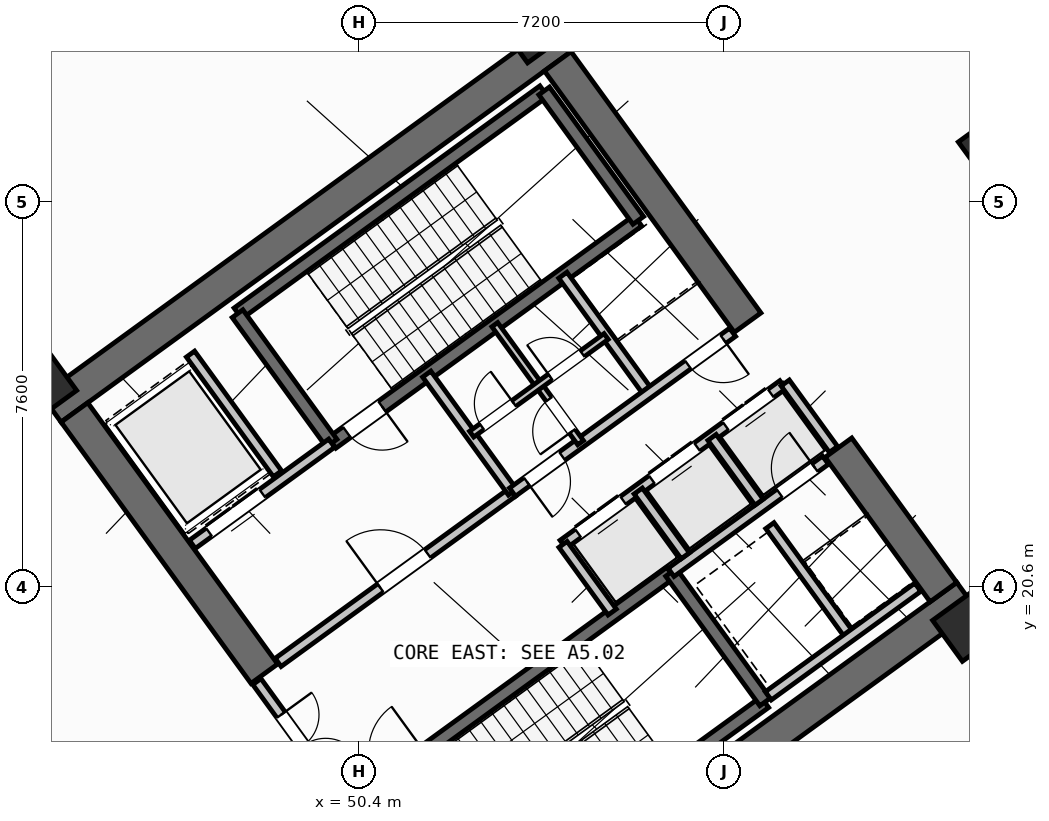
"""IFC4 building model, lengths in metres.
Left out: names, types, materials, properties, quantities, classifications, styles, units other than length and angle.
Written with IfcOpenShell. Run it as: python <this file> out.ifc"""

import sys

from ifc_helpers import new_model, si_unit, direction, frame, frame_2d, origin, origin_2d, place, context, subcontext, project, spatial, rectangle, hollow_rectangle, extrude, source, transform, mapped, element, fill, save


model = new_model("IFC4")
c1 = context("Model", 3, precision=1e-05, world=origin(), true_north=direction((0.0, 1.0)))
c2 = subcontext(c1, "Body", "Model", "MODEL_VIEW")
j1 = project(units=[si_unit("LENGTHUNIT", "METRE"), si_unit("PLANEANGLEUNIT", "RADIAN")], contexts=[c1])
p1 = place(None, origin())
s1 = spatial("IfcSite", under=j1, at=p1, CompositionType="ELEMENT")
p2 = place(p1, origin())
s2 = spatial("IfcBuilding", under=s1, at=p2, CompositionType="ELEMENT")
p3 = place(p2, frame((0.0, 0.0, 5.4)))
s3 = spatial("IfcBuildingStorey", under=s2, at=p3, CompositionType="ELEMENT", Elevation=5.4)
p4 = place(p3, frame((52.318, 13.11, 0.0), z_axis=(0.0, 0.0, 1.0), x_axis=(0.809019445368, 0.587781878776, 0.0)))
e1 = element("IfcWall", 1, at=p4, inside=s3, PredefinedType="SHEAR", context=c2, shape_type="SweptSolid", body=[
    extrude(rectangle(XDim=12.44, YDim=0.65, at=frame_2d((6.22, 0.0))), origin(), (0.0, 0.0, 1.0), 4.45),
])
p5 = place(p3, frame((44.325, 24.113, 0.0), z_axis=(0.0, 0.0, 1.0), x_axis=(0.809012664862, 0.58779121131, 0.0)))
e2 = element("IfcWall", 2, at=p5, inside=s3, PredefinedType="SHEAR", context=c2, shape_type="SweptSolid", body=[
    extrude(rectangle(XDim=12.44, YDim=0.65, at=frame_2d((6.22, 0.0))), origin(), (0.0, 0.0, 1.0), 4.45),
])
p6 = place(p3, frame((48.526, 18.884, 0.0), z_axis=(0.0, 0.0, 1.0), x_axis=(-0.58777996584, 0.809020835181, 0.0)))
e3 = element("IfcWall", 3, at=p6, inside=s3, PredefinedType="SHEAR", context=c2, shape_type="SweptSolid", body=[
    extrude(rectangle(XDim=6.375, YDim=0.65, at=frame_2d((3.188, 0.0))), origin(), (0.0, 0.0, 1.0), 4.45),
])
p7 = place(p3, frame((61.929, 20.494, 0.0), z_axis=(0.0, 0.0, 1.0), x_axis=(-0.58782982593, 0.808984607855, 0.0)))
e4 = element("IfcWall", 4, at=p7, inside=s3, PredefinedType="SHEAR", context=c2, shape_type="SweptSolid", body=[
    extrude(rectangle(XDim=3.525, YDim=0.65, at=frame_2d((1.762, 0.0))), origin(), (0.0, 0.0, 1.0), 4.45),
])
p8 = place(p3, frame((58.064, 25.813, 0.0), z_axis=(0.0, 0.0, 1.0), x_axis=(-0.58777996584, 0.809020835181, 0.0)))
e5 = element("IfcWall", 5, at=p8, inside=s3, PredefinedType="SHEAR", context=c2, shape_type="SweptSolid", body=[
    extrude(rectangle(XDim=6.375, YDim=0.65, at=frame_2d((3.188, 0.0))), origin(), (0.0, 0.0, 1.0), 4.45),
])
m1 = source(origin(), c2, "Body", "SweptSolid", [
    extrude(hollow_rectangle(XDim=1.08, YDim=1.08, WallThickness=0.04, at=origin_2d()), origin(), (0.0, 0.0, 1.0), 4.8),
])
p9 = place(p3, frame((62.977, 29.259, 0.0), z_axis=(0.0, 0.0, 1.0), x_axis=(0.809016994375, 0.587785252292, 0.0)))
e6 = element("IfcColumn", 6, at=p9, inside=s3, PredefinedType="COLUMN", context=c2, shape_type="MappedRepresentation", body=[
    mapped(m1, transform((0.0, 0.0, 0.0), scale=1.0)),
])
m2 = source(origin(), c2, "Body", "SweptSolid", [
    extrude(hollow_rectangle(XDim=1.0, YDim=1.0, WallThickness=0.04, at=origin_2d()), origin(), (0.0, 0.0, 1.0), 4.8),
])
for number, where, z_axis, x_axis in (
    (7, (44.124, 24.585, 0.0), (0.0, 0.0, 1.0), (0.809, 0.588, 0.0)),
    (8, (62.414, 19.827, 0.0), (0.0, 0.0, 1.0), (0.809, 0.588, 0.0)),
    (9, (53.832, 31.638, 0.0), (0.0, 0.0, 1.0), (0.809, 0.588, 0.0)),
):
    element("IfcColumn", number, at=place(p3, frame(where, z_axis=z_axis, x_axis=x_axis)), inside=s3, PredefinedType="COLUMN", context=c2, shape_type="MappedRepresentation", body=[
        mapped(m2, transform((0.0, 0.0, 0.0), scale=1.0)),
    ])
p10 = place(p3, frame((48.006, 25.996, 0.0), z_axis=(0.0, 0.0, 1.0), x_axis=(0.80901903764, 0.587782439969, 0.0)))
e10 = element("IfcWall", 10, at=p10, inside=s3, PredefinedType="SHEAR", context=c2, shape_type="SweptSolid", body=[
    extrude(rectangle(XDim=7.46, YDim=0.26, at=frame_2d((3.73, 0.0))), origin(), (0.0, 0.0, 1.0), 4.45),
])
p11 = place(p3, frame((49.863, 23.44, 0.0), z_axis=(0.0, 0.0, 1.0), x_axis=(0.809003474932, 0.587803859759, 0.0)))
e11 = element("IfcWall", 11, at=p11, inside=s3, PredefinedType="SHEAR", context=c2, shape_type="SweptSolid", body=[
    extrude(rectangle(XDim=7.46, YDim=0.26, at=frame_2d((3.73, 0.0))), origin(), (0.0, 0.0, 1.0), 4.45),
])
p12 = place(p11, frame((0.36, 0.0, 0.0)))
e12 = element("IfcOpeningElement", 12, at=p12, cuts=e11, PredefinedType="OPENING", context=c2, shape_type="SweptSolid", body=[
    extrude(rectangle(XDim=0.86, YDim=2.05, at=frame_2d((0.43, 1.025))), frame((0.0, 0.14, 0.0), z_axis=(0.0, -1.0, 0.0), x_axis=(1.0, 0.0, 0.0)), (0.0, 0.0, 1.0), 0.28),
])
p13 = place(p3, frame((49.855, 23.434, 0.0), z_axis=(0.0, 0.0, 1.0), x_axis=(-0.58776738483, 0.809029975545, 0.0)))
e13 = element("IfcWall", 13, at=p13, inside=s3, PredefinedType="SHEAR", context=c2, shape_type="SweptSolid", body=[
    extrude(rectangle(XDim=3.16, YDim=0.26, at=frame_2d((1.58, 0.0))), origin(), (0.0, 0.0, 1.0), 4.45),
])
p14 = place(p3, frame((55.906, 27.831, 0.0), z_axis=(0.0, 0.0, 1.0), x_axis=(-0.587804123638, 0.809003283204, 0.0)))
e14 = element("IfcWall", 14, at=p14, inside=s3, PredefinedType="SHEAR", context=c2, shape_type="SweptSolid", body=[
    extrude(rectangle(XDim=3.16, YDim=0.26, at=frame_2d((1.58, 0.0))), origin(), (0.0, 0.0, 1.0), 4.45),
])
p15 = place(p3, frame((52.472, 14.013, 0.0), z_axis=(0.0, 0.0, 1.0), x_axis=(0.809028366311, 0.587769599847, 0.0)))
e15 = element("IfcWall", 15, at=p15, inside=s3, PredefinedType="SHEAR", context=c2, shape_type="SweptSolid", body=[
    extrude(rectangle(XDim=7.33, YDim=0.26, at=frame_2d((3.665, 0.0))), origin(), (0.0, 0.0, 1.0), 4.45),
])
p16 = place(p3, frame((50.615, 16.57, 0.0), z_axis=(0.0, 0.0, 1.0), x_axis=(0.809028366311, 0.587769599847, 0.0)))
e16 = element("IfcWall", 16, at=p16, inside=s3, PredefinedType="SHEAR", context=c2, shape_type="SweptSolid", body=[
    extrude(rectangle(XDim=7.33, YDim=0.26, at=frame_2d((3.665, 0.0))), origin(), (0.0, 0.0, 1.0), 4.45),
])
p17 = place(p16, frame((0.22, 0.0, 0.0)))
e17 = element("IfcOpeningElement", 17, at=p17, cuts=e16, PredefinedType="OPENING", context=c2, shape_type="SweptSolid", body=[
    extrude(rectangle(XDim=1.1, YDim=2.1, at=frame_2d((0.55, 1.05))), frame((0.0, 0.14, 0.0), z_axis=(0.0, -1.0, 0.0), x_axis=(1.0, 0.0, 0.0)), (0.0, 0.0, 1.0), 0.28),
])
p18 = place(p3, frame((58.41, 18.327, 0.0), z_axis=(0.0, 0.0, 1.0), x_axis=(-0.58776738483, 0.809029975545, 0.0)))
e18 = element("IfcWall", 18, at=p18, inside=s3, PredefinedType="SHEAR", context=c2, shape_type="SweptSolid", body=[
    extrude(rectangle(XDim=3.16, YDim=0.26, at=frame_2d((1.58, 0.0))), origin(), (0.0, 0.0, 1.0), 4.45),
])
p19 = place(p3, frame((47.106, 21.437, 0.0), z_axis=(0.0, 0.0, 1.0), x_axis=(0.809012514015, 0.58779141893, 0.0)))
e19 = element("IfcWall", 19, at=p19, inside=s3, PredefinedType="STANDARD", context=c2, shape_type="SweptSolid", body=[
    extrude(rectangle(XDim=3.398, YDim=0.2, at=frame_2d((1.699, 0.0))), origin(), (0.0, 0.0, 1.0), 4.44),
])
p20 = place(p19, frame((0.408, 0.0, 0.0)))
e20 = element("IfcOpeningElement", 20, at=p20, cuts=e19, PredefinedType="OPENING", context=c2, shape_type="SweptSolid", body=[
    extrude(rectangle(XDim=1.3, YDim=2.2, at=frame_2d((0.65, 1.1))), frame((0.0, 0.11, 0.0), z_axis=(0.0, -1.0, 0.0), x_axis=(1.0, 0.0, 0.0)), (0.0, 0.0, 1.0), 0.22),
])
p21 = place(p3, frame((48.799, 19.107, 0.0), z_axis=(0.0, 0.0, 1.0), x_axis=(0.809012959416, 0.587790805897, 0.0)))
e21 = element("IfcWall", 21, at=p21, inside=s3, PredefinedType="STANDARD", context=c2, shape_type="SweptSolid", body=[
    extrude(rectangle(XDim=5.718, YDim=0.2, at=frame_2d((2.859, 0.0))), origin(), (0.0, 0.0, 1.0), 4.44),
])
p22 = place(p21, frame((2.498, 0.0, 0.0)))
e22 = element("IfcOpeningElement", 22, at=p22, cuts=e21, PredefinedType="OPENING", context=c2, shape_type="SweptSolid", body=[
    extrude(rectangle(XDim=1.15, YDim=2.1, at=frame_2d((0.575, 1.05))), frame((0.0, 0.11, 0.0), z_axis=(0.0, -1.0, 0.0), x_axis=(1.0, 0.0, 0.0)), (0.0, 0.0, 1.0), 0.22),
])
p23 = place(p3, frame((56.553, 20.884, 0.0), z_axis=(0.0, 0.0, 1.0), x_axis=(0.809035789462, 0.587759382205, 0.0)))
e23 = element("IfcWall", 23, at=p23, inside=s3, PredefinedType="STANDARD", context=c2, shape_type="SweptSolid", body=[
    extrude(rectangle(XDim=3.768, YDim=0.2, at=frame_2d((1.884, 0.0))), origin(), (0.0, 0.0, 1.0), 4.44),
])
p24 = place(p23, frame((2.65, 0.0, 0.0)))
e24 = element("IfcOpeningElement", 24, at=p24, cuts=e23, PredefinedType="OPENING", context=c2, shape_type="SweptSolid", body=[
    extrude(rectangle(XDim=0.86, YDim=2.05, at=frame_2d((0.43, 1.025))), frame((0.0, 0.11, 0.0), z_axis=(0.0, -1.0, 0.0), x_axis=(1.0, 0.0, 0.0)), (0.0, 0.0, 1.0), 0.22),
])
p25 = place(p3, frame((54.421, 21.436, 0.0), z_axis=(0.0, 0.0, 1.0), x_axis=(0.809013710463, 0.587789772183, 0.0)))
e25 = element("IfcWall", 25, at=p25, inside=s3, PredefinedType="STANDARD", context=c2, shape_type="SweptSolid", body=[
    extrude(rectangle(XDim=5.36, YDim=0.2, at=frame_2d((2.68, 0.0))), origin(), (0.0, 0.0, 1.0), 4.44),
])
p26 = place(p25, frame((0.37, 0.0, 0.0)))
e26 = element("IfcOpeningElement", 26, at=p26, cuts=e25, PredefinedType="OPENING", context=c2, shape_type="SweptSolid", body=[
    extrude(rectangle(XDim=1.1, YDim=2.15, at=frame_2d((0.55, 1.075))), frame((0.0, 0.11, 0.0), z_axis=(0.0, -1.0, 0.0), x_axis=(1.0, 0.0, 0.0)), (0.0, 0.0, 1.0), 0.22),
])
p27 = place(p25, frame((2.17, 0.0, 0.0)))
e27 = element("IfcOpeningElement", 27, at=p27, cuts=e25, PredefinedType="OPENING", context=c2, shape_type="SweptSolid", body=[
    extrude(rectangle(XDim=1.1, YDim=2.15, at=frame_2d((0.55, 1.075))), frame((0.0, 0.11, 0.0), z_axis=(0.0, -1.0, 0.0), x_axis=(1.0, 0.0, 0.0)), (0.0, 0.0, 1.0), 0.22),
])
p28 = place(p25, frame((3.97, 0.0, 0.0)))
e28 = element("IfcOpeningElement", 28, at=p28, cuts=e25, PredefinedType="OPENING", context=c2, shape_type="SweptSolid", body=[
    extrude(rectangle(XDim=1.1, YDim=2.15, at=frame_2d((0.55, 1.075))), frame((0.0, 0.11, 0.0), z_axis=(0.0, -1.0, 0.0), x_axis=(1.0, 0.0, 0.0)), (0.0, 0.0, 1.0), 0.22),
])
p29 = place(p3, frame((55.391, 20.102, 0.0), z_axis=(0.0, 0.0, 1.0), x_axis=(-0.58778447739, 0.809017557374, 0.0)))
e29 = element("IfcWall", 29, at=p29, inside=s3, PredefinedType="STANDARD", context=c2, shape_type="SweptSolid", body=[
    extrude(rectangle(XDim=1.65, YDim=0.2, at=frame_2d((0.825, 0.0))), origin(), (0.0, 0.0, 1.0), 4.44),
])
p30 = place(p3, frame((48.786, 22.83, 0.0), z_axis=(0.0, 0.0, 1.0), x_axis=(-0.587783856777, 0.809018008275, 0.0)))
e30 = element("IfcWall", 30, at=p30, inside=s3, PredefinedType="STANDARD", context=c2, shape_type="SweptSolid", body=[
    extrude(rectangle(XDim=2.92, YDim=0.2, at=frame_2d((1.46, 0.0))), origin(), (0.0, 0.0, 1.0), 4.44),
])
p31 = place(p3, frame((56.834, 21.212, 0.0), z_axis=(0.0, 0.0, 1.0), x_axis=(-0.58776738483, 0.809029975545, 0.0)))
e31 = element("IfcWall", 31, at=p31, inside=s3, PredefinedType="STANDARD", context=c2, shape_type="SweptSolid", body=[
    extrude(rectangle(XDim=1.58, YDim=0.2, at=frame_2d((0.79, 0.0))), origin(), (0.0, 0.0, 1.0), 4.44),
])
p32 = place(p3, frame((58.29, 22.27, 0.0), z_axis=(0.0, 0.0, 1.0), x_axis=(-0.587840865826, 0.808976585857, 0.0)))
e32 = element("IfcWall", 32, at=p32, inside=s3, PredefinedType="STANDARD", context=c2, shape_type="SweptSolid", body=[
    extrude(rectangle(XDim=1.58, YDim=0.2, at=frame_2d((0.79, 0.0))), origin(), (0.0, 0.0, 1.0), 4.44),
])
p33 = place(p3, frame((59.758, 23.312, 0.0), z_axis=(0.0, 0.0, 1.0), x_axis=(-0.587875962906, 0.808951081486, 0.0)))
e33 = element("IfcWall", 33, at=p33, inside=s3, PredefinedType="STANDARD", context=c2, shape_type="SweptSolid", body=[
    extrude(rectangle(XDim=1.62, YDim=0.2, at=frame_2d((0.81, 0.0))), origin(), (0.0, 0.0, 1.0), 4.44),
])
p34 = place(p3, frame((60.067, 19.655, 0.0), z_axis=(0.0, 0.0, 1.0), x_axis=(-0.587800520745, 0.809005900975, 0.0)))
e34 = element("IfcWall", 34, at=p34, inside=s3, PredefinedType="STANDARD", context=c2, shape_type="SweptSolid", body=[
    extrude(rectangle(XDim=2.66, YDim=0.2, at=frame_2d((1.33, 0.0))), origin(), (0.0, 0.0, 1.0), 4.44),
])
p35 = place(p3, frame((58.472, 18.447, 0.0), z_axis=(0.0, 0.0, 1.0), x_axis=(0.809022487728, 0.587777691266, 0.0)))
e35 = element("IfcWall", 35, at=p35, inside=s3, PredefinedType="STANDARD", context=c2, shape_type="SweptSolid", body=[
    extrude(rectangle(XDim=3.648, YDim=0.2, at=frame_2d((1.824, 0.0))), origin(), (0.0, 0.0, 1.0), 4.44),
])
p36 = place(p3, frame((53.425, 22.468, 0.0), z_axis=(0.0, 0.0, 1.0), x_axis=(-0.5877230039, 0.809062216821, 0.0)))
e36 = element("IfcWall", 36, at=p36, inside=s3, PredefinedType="STANDARD", context=c2, shape_type="SweptSolid", body=[
    extrude(rectangle(XDim=2.88, YDim=0.2, at=frame_2d((1.44, 0.0))), origin(), (0.0, 0.0, 1.0), 4.44),
])
p37 = place(p3, frame((56.111, 24.419, 0.0), z_axis=(0.0, 0.0, 1.0), x_axis=(-0.58777848983, 0.809021907548, 0.0)))
e37 = element("IfcWall", 37, at=p37, inside=s3, PredefinedType="STANDARD", context=c2, shape_type="SweptSolid", body=[
    extrude(rectangle(XDim=2.88, YDim=0.2, at=frame_2d((1.44, 0.0))), origin(), (0.0, 0.0, 1.0), 4.44),
])
p38 = place(p3, frame((53.425, 22.468, 0.0), z_axis=(0.0, 0.0, 1.0), x_axis=(0.80902705128, 0.587771409902, 0.0)))
e38 = element("IfcWall", 38, at=p38, inside=s3, PredefinedType="STANDARD", context=c2, shape_type="SweptSolid", body=[
    extrude(rectangle(XDim=5.368, YDim=0.2, at=frame_2d((2.684, 0.0))), origin(), (0.0, 0.0, 1.0), 4.44),
])
p39 = place(p38, frame((4.28, 0.0, 0.0)))
e39 = element("IfcOpeningElement", 39, at=p39, cuts=e38, PredefinedType="OPENING", context=c2, shape_type="SweptSolid", body=[
    extrude(rectangle(XDim=0.86, YDim=2.05, at=frame_2d((0.43, 1.025))), frame((0.0, 0.11, 0.0), z_axis=(0.0, -1.0, 0.0), x_axis=(1.0, 0.0, 0.0)), (0.0, 0.0, 1.0), 0.22),
])
p40 = place(p38, frame((0.35, 0.0, 0.0)))
e40 = element("IfcOpeningElement", 40, at=p40, cuts=e38, PredefinedType="OPENING", context=c2, shape_type="SweptSolid", body=[
    extrude(rectangle(XDim=0.86, YDim=2.05, at=frame_2d((0.43, 1.025))), frame((0.0, 0.11, 0.0), z_axis=(0.0, -1.0, 0.0), x_axis=(1.0, 0.0, 0.0)), (0.0, 0.0, 1.0), 0.22),
])
p41 = place(p3, frame((54.768, 23.443, 0.0), z_axis=(0.0, 0.0, 1.0), x_axis=(-0.587736077749, 0.809052719489, 0.0)))
e41 = element("IfcWall", 41, at=p41, inside=s3, PredefinedType="PLUMBINGWALL", context=c2, shape_type="SweptSolid", body=[
    extrude(rectangle(XDim=1.4, YDim=0.14, at=frame_2d((0.7, 0.0))), origin(), (0.0, 0.0, 1.0), 4.44),
])
p42 = place(p41, frame((0.28, 0.0, 0.0)))
e42 = element("IfcOpeningElement", 42, at=p42, cuts=e41, PredefinedType="OPENING", context=c2, shape_type="SweptSolid", body=[
    extrude(rectangle(XDim=0.78, YDim=2.05, at=frame_2d((0.39, 1.025))), frame((0.0, 0.08, 0.0), z_axis=(0.0, -1.0, 0.0), x_axis=(1.0, 0.0, 0.0)), (0.0, 0.0, 1.0), 0.16),
])
p43 = place(p3, frame((53.945, 24.576, 0.0), z_axis=(0.0, 0.0, 1.0), x_axis=(-0.587897037186, 0.808935766095, 0.0)))
e43 = element("IfcWall", 43, at=p43, inside=s3, PredefinedType="PLUMBINGWALL", context=c2, shape_type="SweptSolid", body=[
    extrude(rectangle(XDim=1.48, YDim=0.14, at=frame_2d((0.74, 0.0))), origin(), (0.0, 0.0, 1.0), 4.44),
])
p44 = place(p3, frame((52.618, 23.612, 0.0), z_axis=(0.0, 0.0, 1.0), x_axis=(0.809009587469, 0.587795446889, 0.0)))
e44 = element("IfcWall", 44, at=p44, inside=s3, PredefinedType="PLUMBINGWALL", context=c2, shape_type="SweptSolid", body=[
    extrude(rectangle(XDim=3.28, YDim=0.14, at=frame_2d((1.64, 0.0))), origin(), (0.0, 0.0, 1.0), 4.44),
])
p45 = place(p44, frame((0.25, 0.0, 0.0)))
e45 = element("IfcOpeningElement", 45, at=p45, cuts=e44, PredefinedType="OPENING", context=c2, shape_type="SweptSolid", body=[
    extrude(rectangle(XDim=0.78, YDim=2.05, at=frame_2d((0.39, 1.025))), frame((0.0, 0.08, 0.0), z_axis=(0.0, -1.0, 0.0), x_axis=(1.0, 0.0, 0.0)), (0.0, 0.0, 1.0), 0.16),
])
p46 = place(p44, frame((1.92, 0.0, 0.0)))
e46 = element("IfcOpeningElement", 46, at=p46, cuts=e44, PredefinedType="OPENING", context=c2, shape_type="SweptSolid", body=[
    extrude(rectangle(XDim=0.78, YDim=2.05, at=frame_2d((0.39, 1.025))), frame((0.0, 0.08, 0.0), z_axis=(0.0, -1.0, 0.0), x_axis=(1.0, 0.0, 0.0)), (0.0, 0.0, 1.0), 0.16),
])
p47 = place(p3, frame((50.119, 16.333, 0.0), z_axis=(0.0, 0.0, 1.0), x_axis=(-0.587749856981, 0.809042709391, 0.0)))
e47 = element("IfcWall", 47, at=p47, inside=s3, PredefinedType="STANDARD", context=c2, shape_type="SweptSolid", body=[
    extrude(rectangle(XDim=2.96, YDim=0.2, at=frame_2d((1.48, 0.0))), origin(), (0.0, 0.0, 1.0), 4.44),
])
p48 = place(p47, frame((0.65, 0.0, 0.0)))
e48 = element("IfcOpeningElement", 48, at=p48, cuts=e47, PredefinedType="OPENING", context=c2, shape_type="SweptSolid", body=[
    extrude(rectangle(XDim=1.5, YDim=2.15, at=frame_2d((0.75, 1.075))), frame((0.0, 0.11, 0.0), z_axis=(0.0, -1.0, 0.0), x_axis=(1.0, 0.0, 0.0)), (0.0, 0.0, 1.0), 0.22),
])
m3 = source(origin(), c2, "Body", "SweptSolid", [
    extrude(rectangle(XDim=0.86, YDim=2.05, at=frame_2d((0.43, 1.025))), frame((0.0, 0.025, 0.0), z_axis=(0.0, -1.0, 0.0), x_axis=(1.0, 0.0, 0.0)), (0.0, 0.0, 1.0), 0.05),
])
p49 = place(p12, frame((0.86, 0.0, 0.0), z_axis=(0.0, 0.0, 1.0), x_axis=(-1.0, 0.0, 0.0)))
e49 = element("IfcDoor", 49, at=p49, inside=s3, OperationType="SINGLE_SWING_LEFT", PredefinedType="DOOR", context=c2, shape_type="MappedRepresentation", body=[
    mapped(m3, transform((0.0, 0.0, 0.0), scale=1.0)),
])
fill(e12, e49)
m4 = source(origin(), c2, "Body", "SweptSolid", [
    extrude(rectangle(XDim=1.15, YDim=2.1, at=frame_2d((0.575, 1.05))), frame((0.0, 0.025, 0.0), z_axis=(0.0, -1.0, 0.0), x_axis=(1.0, 0.0, 0.0)), (0.0, 0.0, 1.0), 0.05),
])
p50 = place(p22, origin())
e50 = element("IfcDoor", 50, at=p50, inside=s3, OperationType="SINGLE_SWING_LEFT", PredefinedType="DOOR", context=c2, shape_type="MappedRepresentation", body=[
    mapped(m4, transform((0.0, 0.0, 0.0), scale=1.0)),
])
fill(e22, e50)
m5 = source(origin(), c2, "Body", "SweptSolid", [
    extrude(rectangle(XDim=1.3, YDim=2.2, at=frame_2d((0.65, 1.1))), frame((0.0, 0.025, 0.0), z_axis=(0.0, -1.0, 0.0), x_axis=(1.0, 0.0, 0.0)), (0.0, 0.0, 1.0), 0.05),
])
p51 = place(p20, origin())
e51 = element("IfcDoor", 51, at=p51, inside=s3, OperationType="DOUBLE_DOOR_SLIDING", PredefinedType="DOOR", context=c2, shape_type="MappedRepresentation", body=[
    mapped(m5, transform((0.0, 0.0, 0.0), scale=1.0)),
])
fill(e20, e51)
m6 = source(origin(), c2, "Body", "SweptSolid", [
    extrude(rectangle(XDim=1.1, YDim=2.15, at=frame_2d((0.55, 1.075))), frame((0.0, 0.025, 0.0), z_axis=(0.0, -1.0, 0.0), x_axis=(1.0, 0.0, 0.0)), (0.0, 0.0, 1.0), 0.05),
])
p52 = place(p26, origin())
e52 = element("IfcDoor", 52, at=p52, inside=s3, OperationType="DOUBLE_DOOR_SLIDING", PredefinedType="DOOR", context=c2, shape_type="MappedRepresentation", body=[
    mapped(m6, transform((0.0, 0.0, 0.0), scale=1.0)),
])
fill(e26, e52)
p53 = place(p27, origin())
e53 = element("IfcDoor", 53, at=p53, inside=s3, OperationType="DOUBLE_DOOR_SLIDING", PredefinedType="DOOR", context=c2, shape_type="MappedRepresentation", body=[
    mapped(m6, transform((0.0, 0.0, 0.0), scale=1.0)),
])
fill(e27, e53)
p54 = place(p28, origin())
e54 = element("IfcDoor", 54, at=p54, inside=s3, OperationType="DOUBLE_DOOR_SLIDING", PredefinedType="DOOR", context=c2, shape_type="MappedRepresentation", body=[
    mapped(m6, transform((0.0, 0.0, 0.0), scale=1.0)),
])
fill(e28, e54)
p55 = place(p24, origin())
e55 = element("IfcDoor", 55, at=p55, inside=s3, OperationType="SINGLE_SWING_RIGHT", PredefinedType="DOOR", context=c2, shape_type="MappedRepresentation", body=[
    mapped(m3, transform((0.0, 0.0, 0.0), scale=1.0)),
])
fill(e24, e55)
p56 = place(p39, frame((0.86, 0.0, 0.0), z_axis=(0.0, 0.0, 1.0), x_axis=(-1.0, 0.0, 0.0)))
e56 = element("IfcDoor", 56, at=p56, inside=s3, OperationType="SINGLE_SWING_LEFT", PredefinedType="DOOR", context=c2, shape_type="MappedRepresentation", body=[
    mapped(m3, transform((0.0, 0.0, 0.0), scale=1.0)),
])
fill(e39, e56)
p57 = place(p40, frame((0.86, 0.0, 0.0), z_axis=(0.0, 0.0, 1.0), x_axis=(-1.0, 0.0, 0.0)))
e57 = element("IfcDoor", 57, at=p57, inside=s3, OperationType="SINGLE_SWING_RIGHT", PredefinedType="DOOR", context=c2, shape_type="MappedRepresentation", body=[
    mapped(m3, transform((0.0, 0.0, 0.0), scale=1.0)),
])
fill(e40, e57)
m7 = source(origin(), c2, "Body", "SweptSolid", [
    extrude(rectangle(XDim=0.78, YDim=2.05, at=frame_2d((0.39, 1.025))), frame((0.0, 0.025, 0.0), z_axis=(0.0, -1.0, 0.0), x_axis=(1.0, 0.0, 0.0)), (0.0, 0.0, 1.0), 0.05),
])
p58 = place(p42, origin())
e58 = element("IfcDoor", 58, at=p58, inside=s3, OperationType="SINGLE_SWING_LEFT", PredefinedType="DOOR", context=c2, shape_type="MappedRepresentation", body=[
    mapped(m7, transform((0.0, 0.0, 0.0), scale=1.0)),
])
fill(e42, e58)
p59 = place(p45, origin())
e59 = element("IfcDoor", 59, at=p59, inside=s3, OperationType="SINGLE_SWING_RIGHT", PredefinedType="DOOR", context=c2, shape_type="MappedRepresentation", body=[
    mapped(m7, transform((0.0, 0.0, 0.0), scale=1.0)),
])
fill(e45, e59)
p60 = place(p46, origin())
e60 = element("IfcDoor", 60, at=p60, inside=s3, OperationType="SINGLE_SWING_LEFT", PredefinedType="DOOR", context=c2, shape_type="MappedRepresentation", body=[
    mapped(m7, transform((0.0, 0.0, 0.0), scale=1.0)),
])
fill(e46, e60)
m8 = source(origin(), c2, "Body", "SweptSolid", [
    extrude(rectangle(XDim=1.5, YDim=2.15, at=frame_2d((0.75, 1.075))), frame((0.0, 0.025, 0.0), z_axis=(0.0, -1.0, 0.0), x_axis=(1.0, 0.0, 0.0)), (0.0, 0.0, 1.0), 0.05),
])
p61 = place(p48, frame((1.5, 0.0, 0.0), z_axis=(0.0, 0.0, 1.0), x_axis=(-1.0, 0.0, 0.0)))
e61 = element("IfcDoor", 61, at=p61, inside=s3, OperationType="DOUBLE_DOOR_SINGLE_SWING", PredefinedType="DOOR", context=c2, shape_type="MappedRepresentation", body=[
    mapped(m8, transform((0.0, 0.0, 0.0), scale=1.0)),
])
fill(e48, e61)
save(model, sys.argv[1])
